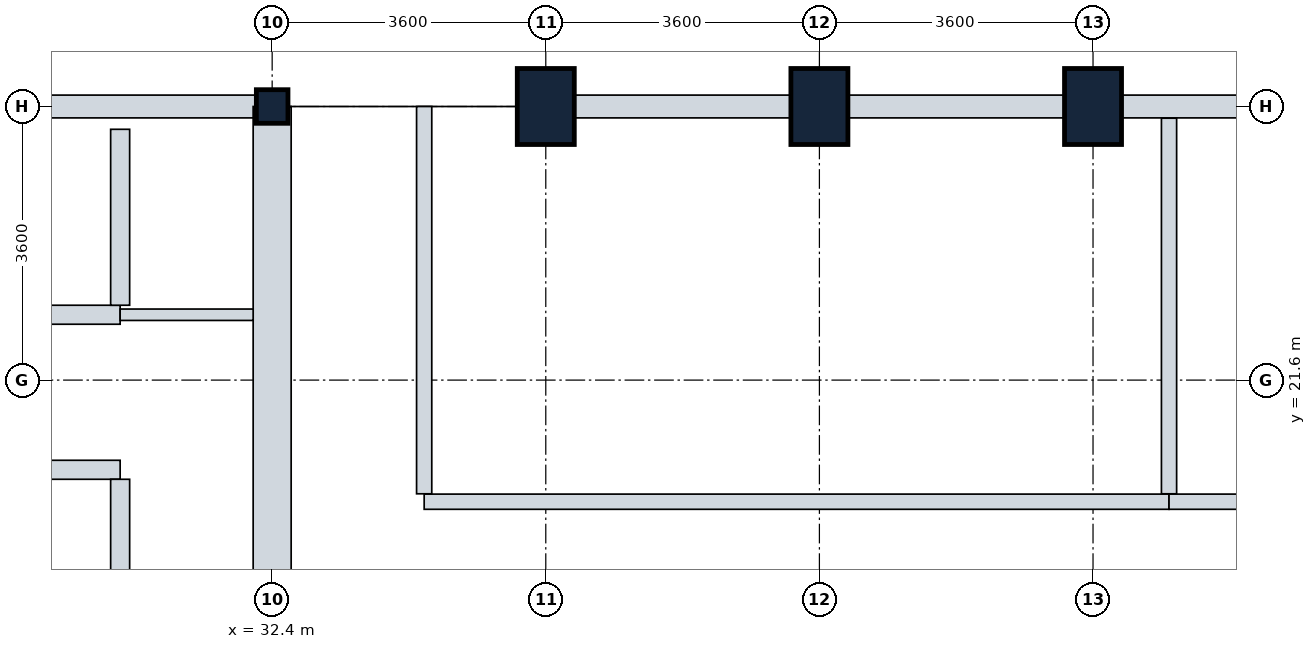
"""IFC4 building model, lengths in metres.
Left out: names, types, materials, properties, quantities, classifications, styles, units other than length and angle.
Written with IfcOpenShell. Run it as: python <this file> out.ifc"""

import sys

from ifc_helpers import new_model, si_unit, direction, frame, frame_2d, origin, origin_2d, place, context, subcontext, project, spatial, rectangle, i_section, extrude, element, fill, save


model = new_model("IFC4")
c1 = context("Model", 3, precision=1e-05, world=origin(), true_north=direction((0.0, 1.0)))
c2 = subcontext(c1, "Body", "Model", "MODEL_VIEW")
j1 = project(units=[si_unit("LENGTHUNIT", "METRE"), si_unit("PLANEANGLEUNIT", "RADIAN")], contexts=[c1])
p1 = place(None, origin())
s1 = spatial("IfcSite", under=j1, at=p1, CompositionType="ELEMENT")
p2 = place(p1, origin())
s2 = spatial("IfcBuilding", under=s1, at=p2, CompositionType="ELEMENT")
p3 = place(p2, frame((0.0, 0.0, 169.4)))
s3 = spatial("IfcBuildingStorey", under=s2, at=p3, CompositionType="ELEMENT", Elevation=169.4)
p4 = place(p3, frame((32.4, 25.2, 0.0), z_axis=(0.0, 0.0, 1.0), x_axis=(1.0, 0.0, 0.0)))
e1 = element("IfcColumn", 1, at=p4, inside=s3, PredefinedType="COLUMN", context=c2, shape_type="SweptSolid", body=[
    extrude(i_section(OverallWidth=0.416, OverallDepth=0.442, WebThickness=0.025, FlangeThickness=0.041, FilletRadius=0.015, at=origin_2d()), origin(), (0.0, 0.0, 1.0), 5.4),
])
for number, where, z_axis, x_axis in (
    (2, (36.0, 25.2, 0.0), (0.0, 0.0, 1.0), (1.0, 0.0, 0.0)),
    (3, (39.6, 25.2, 0.0), (0.0, 0.0, 1.0), (1.0, 0.0, 0.0)),
    (4, (43.2, 25.2, 0.0), (0.0, 0.0, 1.0), (1.0, 0.0, 0.0)),
):
    element("IfcColumn", number, at=place(p3, frame(where, z_axis=z_axis, x_axis=x_axis)), inside=s3, PredefinedType="COLUMN", context=c2, shape_type="SweptSolid", body=[
        extrude(rectangle(XDim=0.75, YDim=1.0, at=origin_2d()), origin(), (0.0, 0.0, 1.0), 5.4),
    ])
p5 = place(p3, frame((43.2, 25.2, 0.0), z_axis=(0.0, 0.0, 1.0), x_axis=(1.0, 0.0, 0.0)))
e5 = element("IfcWall", 5, at=p5, inside=s3, PredefinedType="STANDARD", context=c2, shape_type="SweptSolid", body=[
    extrude(rectangle(XDim=3.6, YDim=0.3, at=frame_2d((1.8, 0.0))), origin(), (0.0, 0.0, 1.0), 4.53),
])
p6 = place(p3, frame((39.6, 25.2, 0.0), z_axis=(0.0, 0.0, 1.0), x_axis=(1.0, 0.0, 0.0)))
e6 = element("IfcWall", 6, at=p6, inside=s3, PredefinedType="STANDARD", context=c2, shape_type="SweptSolid", body=[
    extrude(rectangle(XDim=3.6, YDim=0.3, at=frame_2d((1.8, 0.0))), origin(), (0.0, 0.0, 1.0), 4.53),
])
p7 = place(p3, frame((36.0, 25.2, 0.0), z_axis=(0.0, 0.0, 1.0), x_axis=(1.0, 0.0, 0.0)))
e7 = element("IfcWall", 7, at=p7, inside=s3, PredefinedType="STANDARD", context=c2, shape_type="SweptSolid", body=[
    extrude(rectangle(XDim=3.6, YDim=0.3, at=frame_2d((1.8, 0.0))), origin(), (0.0, 0.0, 1.0), 4.53),
])
p8 = place(p3, frame((28.8, 25.2, 0.0), z_axis=(0.0, 0.0, 1.0), x_axis=(1.0, 0.0, 0.0)))
e8 = element("IfcWall", 8, at=p8, inside=s3, PredefinedType="STANDARD", context=c2, shape_type="SweptSolid", body=[
    extrude(rectangle(XDim=3.6, YDim=0.3, at=frame_2d((1.8, 0.0))), origin(), (0.0, 0.0, 1.0), 4.53),
])
p9 = place(p3, frame((32.4, 10.8, 0.0), z_axis=(0.0, 0.0, 1.0), x_axis=(0.0, 1.0, 0.0)))
e9 = element("IfcWall", 9, at=p9, inside=s3, PredefinedType="SHEAR", context=c2, shape_type="SweptSolid", body=[
    extrude(rectangle(XDim=14.4, YDim=0.5, at=frame_2d((7.2, 0.0))), origin(), (0.0, 0.0, 1.0), 5.08),
])
p10 = place(p9, frame((4.35, 0.0, 0.0)))
e10 = element("IfcOpeningElement", 10, at=p10, cuts=e9, PredefinedType="OPENING", context=c2, shape_type="SweptSolid", body=[
    extrude(rectangle(XDim=1.2, YDim=2.1, at=frame_2d((0.6, 1.05))), frame((0.0, 0.26, 0.0), z_axis=(0.0, -1.0, 0.0), x_axis=(1.0, 0.0, 0.0)), (0.0, 0.0, 1.0), 0.52),
])
p11 = place(p9, frame((10.0, 0.0, 0.0)))
e11 = element("IfcOpeningElement", 11, at=p11, cuts=e9, PredefinedType="OPENING", context=c2, shape_type="SweptSolid", body=[
    extrude(rectangle(XDim=1.2, YDim=2.1, at=frame_2d((0.6, 1.05))), frame((0.0, 0.26, 0.0), z_axis=(0.0, -1.0, 0.0), x_axis=(1.0, 0.0, 0.0)), (0.0, 0.0, 1.0), 0.52),
])
p12 = place(p3, frame((23.18, 20.42, 0.0), z_axis=(0.0, 0.0, 1.0), x_axis=(1.0, 0.0, 0.0)))
e12 = element("IfcWall", 12, at=p12, inside=s3, PredefinedType="PARTITIONING", context=c2, shape_type="SweptSolid", body=[
    extrude(rectangle(XDim=7.22, YDim=0.25, at=frame_2d((3.61, 0.0))), origin(), (0.0, 0.0, 1.0), 5.065),
])
p13 = place(p12, frame((0.41, 0.0, 0.0)))
e13 = element("IfcOpeningElement", 13, at=p13, cuts=e12, PredefinedType="OPENING", context=c2, shape_type="SweptSolid", body=[
    extrude(rectangle(XDim=1.1, YDim=2.1, at=frame_2d((0.55, 1.05))), frame((0.0, 0.135, 0.0), z_axis=(0.0, -1.0, 0.0), x_axis=(1.0, 0.0, 0.0)), (0.0, 0.0, 1.0), 0.27),
])
p14 = place(p12, frame((2.19, 0.0, 0.0)))
e14 = element("IfcOpeningElement", 14, at=p14, cuts=e12, PredefinedType="OPENING", context=c2, shape_type="SweptSolid", body=[
    extrude(rectangle(XDim=1.1, YDim=2.1, at=frame_2d((0.55, 1.05))), frame((0.0, 0.135, 0.0), z_axis=(0.0, -1.0, 0.0), x_axis=(1.0, 0.0, 0.0)), (0.0, 0.0, 1.0), 0.27),
])
p15 = place(p12, frame((3.97, 0.0, 0.0)))
e15 = element("IfcOpeningElement", 15, at=p15, cuts=e12, PredefinedType="OPENING", context=c2, shape_type="SweptSolid", body=[
    extrude(rectangle(XDim=1.1, YDim=2.1, at=frame_2d((0.55, 1.05))), frame((0.0, 0.135, 0.0), z_axis=(0.0, -1.0, 0.0), x_axis=(1.0, 0.0, 0.0)), (0.0, 0.0, 1.0), 0.27),
])
p16 = place(p12, frame((5.75, 0.0, 0.0)))
e16 = element("IfcOpeningElement", 16, at=p16, cuts=e12, PredefinedType="OPENING", context=c2, shape_type="SweptSolid", body=[
    extrude(rectangle(XDim=1.1, YDim=2.1, at=frame_2d((0.55, 1.05))), frame((0.0, 0.135, 0.0), z_axis=(0.0, -1.0, 0.0), x_axis=(1.0, 0.0, 0.0)), (0.0, 0.0, 1.0), 0.27),
])
p17 = place(p3, frame((30.4, 18.025, 0.0), z_axis=(0.0, 0.0, 1.0), x_axis=(0.0, 1.0, 0.0)))
e17 = element("IfcWall", 17, at=p17, inside=s3, PredefinedType="PARTITIONING", context=c2, shape_type="SweptSolid", body=[
    extrude(rectangle(XDim=2.27, YDim=0.25, at=frame_2d((1.135, 0.0))), origin(), (0.0, 0.0, 1.0), 5.065),
])
p18 = place(p3, frame((23.18, 22.46, 0.0), z_axis=(0.0, 0.0, 1.0), x_axis=(1.0, 0.0, 0.0)))
e18 = element("IfcWall", 18, at=p18, inside=s3, PredefinedType="PARTITIONING", context=c2, shape_type="SweptSolid", body=[
    extrude(rectangle(XDim=7.22, YDim=0.25, at=frame_2d((3.61, 0.0))), origin(), (0.0, 0.0, 1.0), 5.065),
])
p19 = place(p3, frame((30.4, 22.585, 0.0), z_axis=(0.0, 0.0, 1.0), x_axis=(0.0, 1.0, 0.0)))
e19 = element("IfcWall", 19, at=p19, inside=s3, PredefinedType="PARTITIONING", context=c2, shape_type="SweptSolid", body=[
    extrude(rectangle(XDim=2.315, YDim=0.25, at=frame_2d((1.157, 0.0))), origin(), (0.0, 0.0, 1.0), 5.065),
])
p20 = place(p3, frame((30.4, 22.46, 0.0), z_axis=(0.0, 0.0, 1.0), x_axis=(1.0, 0.0, 0.0)))
e20 = element("IfcWall", 20, at=p20, inside=s3, PredefinedType="PARTITIONING", context=c2, shape_type="SweptSolid", body=[
    extrude(rectangle(XDim=1.75, YDim=0.15, at=frame_2d((0.875, 0.0))), origin(), (0.0, 0.0, 1.0), 5.065),
])
p21 = place(p20, frame((0.42, 0.0, 0.0)))
e21 = element("IfcOpeningElement", 21, at=p21, cuts=e20, PredefinedType="OPENING", context=c2, shape_type="SweptSolid", body=[
    extrude(rectangle(XDim=0.85, YDim=2.1, at=frame_2d((0.425, 1.05))), frame((0.0, 0.085, 0.0), z_axis=(0.0, -1.0, 0.0), x_axis=(1.0, 0.0, 0.0)), (0.0, 0.0, 1.0), 0.17),
])
p22 = place(p3, frame((34.4, 20.0, 0.0), z_axis=(0.0, 0.0, 1.0), x_axis=(1.0, 0.0, 0.0)))
e22 = element("IfcWall", 22, at=p22, inside=s3, PredefinedType="PARTITIONING", context=c2, shape_type="SweptSolid", body=[
    extrude(rectangle(XDim=9.8, YDim=0.2, at=frame_2d((4.9, 0.0))), origin(), (0.0, 0.0, 1.0), 4.7),
])
p23 = place(p22, frame((3.96, 0.0, 0.0)))
e23 = element("IfcOpeningElement", 23, at=p23, cuts=e22, PredefinedType="OPENING", context=c2, shape_type="SweptSolid", body=[
    extrude(rectangle(XDim=1.8, YDim=2.2, at=frame_2d((0.9, 1.1))), frame((0.0, 0.11, 0.0), z_axis=(0.0, -1.0, 0.0), x_axis=(1.0, 0.0, 0.0)), (0.0, 0.0, 1.0), 0.22),
])
p24 = place(p3, frame((44.2, 20.0, 0.0), z_axis=(0.0, 0.0, 1.0), x_axis=(1.0, 0.0, 0.0)))
e24 = element("IfcWall", 24, at=p24, inside=s3, PredefinedType="PARTITIONING", context=c2, shape_type="SweptSolid", body=[
    extrude(rectangle(XDim=9.646, YDim=0.2, at=frame_2d((4.823, 0.0))), origin(), (0.0, 0.0, 1.0), 3.58),
])
p25 = place(p24, frame((4.44, 0.0, 0.0)))
e25 = element("IfcOpeningElement", 25, at=p25, cuts=e24, PredefinedType="OPENING", context=c2, shape_type="SweptSolid", body=[
    extrude(rectangle(XDim=1.0, YDim=2.1, at=frame_2d((0.5, 1.05))), frame((0.0, 0.11, 0.0), z_axis=(0.0, -1.0, 0.0), x_axis=(1.0, 0.0, 0.0)), (0.0, 0.0, 1.0), 0.22),
])
p26 = place(p3, frame((34.4, 20.104, 0.0), z_axis=(0.0, 0.0, 1.0), x_axis=(0.0, 1.0, 0.0)))
e26 = element("IfcWall", 26, at=p26, inside=s3, PredefinedType="PARTITIONING", context=c2, shape_type="SweptSolid", body=[
    extrude(rectangle(XDim=5.096, YDim=0.2, at=frame_2d((2.548, 0.0))), origin(), (0.0, 0.0, 1.0), 4.53),
])
p27 = place(p3, frame((44.2, 20.104, 0.0), z_axis=(0.0, 0.0, 1.0), x_axis=(0.0, 1.0, 0.0)))
e27 = element("IfcWall", 27, at=p27, inside=s3, PredefinedType="PARTITIONING", context=c2, shape_type="SweptSolid", body=[
    extrude(rectangle(XDim=4.942, YDim=0.2, at=frame_2d((2.471, 0.0))), origin(), (0.0, 0.0, 1.0), 4.53),
])
p28 = place(p16, origin())
e28 = element("IfcDoor", 28, at=p28, inside=s3, OperationType="SLIDING_TO_LEFT", PredefinedType="DOOR", context=c2, shape_type="SweptSolid", body=[
    extrude(rectangle(XDim=1.1, YDim=2.1, at=frame_2d((0.55, 1.05))), frame((0.0, 0.025, 0.0), z_axis=(0.0, -1.0, 0.0), x_axis=(1.0, 0.0, 0.0)), (0.0, 0.0, 1.0), 0.05),
])
fill(e16, e28)
p29 = place(p11, origin())
e29 = element("IfcDoor", 29, at=p29, inside=s3, OperationType="SINGLE_SWING_RIGHT", PredefinedType="DOOR", context=c2, shape_type="SweptSolid", body=[
    extrude(rectangle(XDim=1.2, YDim=2.1, at=frame_2d((0.6, 1.05))), frame((0.0, 0.025, 0.0), z_axis=(0.0, -1.0, 0.0), x_axis=(1.0, 0.0, 0.0)), (0.0, 0.0, 1.0), 0.05),
])
fill(e11, e29)
p30 = place(p21, origin())
e30 = element("IfcDoor", 30, at=p30, inside=s3, OperationType="SINGLE_SWING_RIGHT", PredefinedType="DOOR", context=c2, shape_type="SweptSolid", body=[
    extrude(rectangle(XDim=0.85, YDim=2.1, at=frame_2d((0.425, 1.05))), frame((0.0, 0.025, 0.0), z_axis=(0.0, -1.0, 0.0), x_axis=(1.0, 0.0, 0.0)), (0.0, 0.0, 1.0), 0.05),
])
fill(e21, e30)
p31 = place(p23, origin())
e31 = element("IfcDoor", 31, at=p31, inside=s3, OperationType="DOUBLE_DOOR_SINGLE_SWING", PredefinedType="DOOR", context=c2, shape_type="SweptSolid", body=[
    extrude(rectangle(XDim=1.8, YDim=2.2, at=frame_2d((0.9, 1.1))), frame((0.0, 0.025, 0.0), z_axis=(0.0, -1.0, 0.0), x_axis=(1.0, 0.0, 0.0)), (0.0, 0.0, 1.0), 0.05),
])
fill(e23, e31)
save(model, sys.argv[1])
